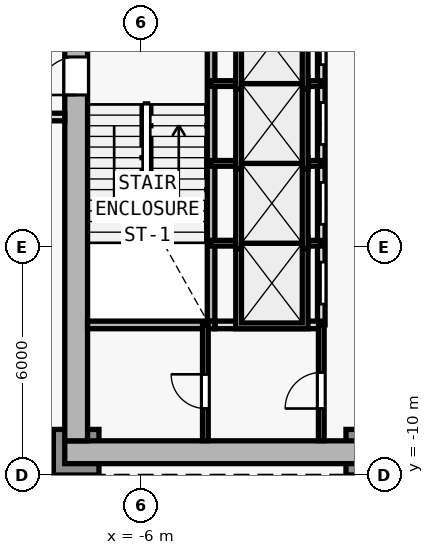
"""IFC4 building model, lengths in metres.
Left out: names, types, materials, properties, quantities, classifications, styles, units other than length and angle.
Written with IfcOpenShell. Run it as: python <this file> out.ifc"""

import sys

from ifc_helpers import new_model, si_unit, direction, frame, frame_2d, origin, origin_2d, place, context, subcontext, project, spatial, rectangle, extrude, element, fill, save


model = new_model("IFC4")
c1 = context("Model", 3, precision=1e-05, world=origin(), true_north=direction((0.0, 1.0)))
c2 = subcontext(c1, "Body", "Model", "MODEL_VIEW")
j1 = project(units=[si_unit("LENGTHUNIT", "METRE"), si_unit("PLANEANGLEUNIT", "RADIAN")], contexts=[c1])
p1 = place(None, origin())
s1 = spatial("IfcSite", under=j1, at=p1, CompositionType="ELEMENT")
p2 = place(p1, origin())
s2 = spatial("IfcBuilding", under=s1, at=p2, CompositionType="ELEMENT")
p3 = place(p2, origin())
s3 = spatial("IfcBuildingStorey", under=s2, at=p3, CompositionType="ELEMENT", Elevation=0.0)
for number, where, z_axis, x_axis in (
    (1, (-7.7, -9.4, 0.0), (0.0, 0.0, 1.0), (1.0, 0.0, 0.0)),
    (2, (0.0, -9.4, 0.0), (0.0, 0.0, 1.0), (1.0, 0.0, 0.0)),
):
    element("IfcColumn", number, at=place(p3, frame(where, z_axis=z_axis, x_axis=x_axis)), inside=s3, PredefinedType="COLUMN", context=c2, shape_type="SweptSolid", body=[
        extrude(rectangle(XDim=1.2, YDim=1.2, at=origin_2d()), origin(), (0.0, 0.0, 1.0), 5.0),
    ])
p4 = place(p3, frame((-8.0, -9.4, 0.0), z_axis=(0.0, 0.0, 1.0), x_axis=(1.0, 0.0, 0.0)))
e3 = element("IfcWall", 3, at=p4, inside=s3, PredefinedType="SHEAR", context=c2, shape_type="SweptSolid", body=[
    extrude(rectangle(XDim=16.0, YDim=0.6, at=frame_2d((8.0, 0.0))), origin(), (0.0, 0.0, 1.0), 4.72),
])
p5 = place(p4, frame((9.65, 0.0, 0.0)))
e4 = element("IfcOpeningElement", 4, at=p5, cuts=e3, PredefinedType="OPENING", context=c2, shape_type="SweptSolid", body=[
    extrude(rectangle(XDim=1.5, YDim=2.2, at=frame_2d((0.75, 1.1))), frame((0.0, 0.31, 0.0), z_axis=(0.0, -1.0, 0.0), x_axis=(1.0, 0.0, 0.0)), (0.0, 0.0, 1.0), 0.62),
])
p6 = place(p3, frame((-7.7, -9.1, 0.0), z_axis=(0.0, 0.0, 1.0), x_axis=(0.0, 1.0, 0.0)))
e5 = element("IfcWall", 5, at=p6, inside=s3, PredefinedType="SHEAR", context=c2, shape_type="SweptSolid", body=[
    extrude(rectangle(XDim=19.0, YDim=0.6, at=frame_2d((9.5, 0.0))), origin(), (0.0, 0.0, 1.0), 4.72),
])
p7 = place(p6, frame((12.65, 0.0, 0.0)))
e6 = element("IfcOpeningElement", 6, at=p7, cuts=e5, PredefinedType="OPENING", context=c2, shape_type="SweptSolid", body=[
    extrude(rectangle(XDim=1.1, YDim=2.15, at=frame_2d((0.55, 1.075))), frame((0.0, 0.31, 0.0), z_axis=(0.0, -1.0, 0.0), x_axis=(1.0, 0.0, 0.0)), (0.0, 0.0, 1.0), 0.62),
])
p8 = place(p6, frame((9.1, 0.0, 0.0)))
e7 = element("IfcOpeningElement", 7, at=p8, cuts=e5, PredefinedType="OPENING", context=c2, shape_type="SweptSolid", body=[
    extrude(rectangle(XDim=1.0, YDim=2.15, at=frame_2d((0.5, 1.075))), frame((0.0, 0.31, 0.0), z_axis=(0.0, -1.0, 0.0), x_axis=(1.0, 0.0, 0.0)), (0.0, 0.0, 1.0), 0.62),
])
p9 = place(p3, frame((-4.15, -5.95, 0.0), z_axis=(0.0, 0.0, 1.0), x_axis=(0.0, 1.0, 0.0)))
e8 = element("IfcWall", 8, at=p9, inside=s3, PredefinedType="SOLIDWALL", context=c2, shape_type="SweptSolid", body=[
    extrude(rectangle(XDim=7.2, YDim=0.2, at=frame_2d((3.6, 0.0))), origin(), (0.0, 0.0, 1.0), 4.72),
])
p10 = place(p3, frame((-1.25, -6.05, 0.0), z_axis=(0.0, 0.0, 1.0), x_axis=(0.0, 1.0, 0.0)))
e9 = element("IfcWall", 9, at=p10, inside=s3, PredefinedType="SOLIDWALL", context=c2, shape_type="SweptSolid", body=[
    extrude(rectangle(XDim=8.7, YDim=0.2, at=frame_2d((4.35, 0.0))), origin(), (0.0, 0.0, 1.0), 4.72),
])
p11 = place(p10, frame((0.55, 0.0, 0.0)))
e10 = element("IfcOpeningElement", 10, at=p11, cuts=e9, PredefinedType="OPENING", context=c2, shape_type="SweptSolid", body=[
    extrude(rectangle(XDim=1.1, YDim=2.15, at=frame_2d((0.55, 1.075))), frame((0.0, 0.11, 0.0), z_axis=(0.0, -1.0, 0.0), x_axis=(1.0, 0.0, 0.0)), (0.0, 0.0, 1.0), 0.22),
])
p12 = place(p10, frame((2.65, 0.0, 0.0)))
e11 = element("IfcOpeningElement", 11, at=p12, cuts=e9, PredefinedType="OPENING", context=c2, shape_type="SweptSolid", body=[
    extrude(rectangle(XDim=1.1, YDim=2.15, at=frame_2d((0.55, 1.075))), frame((0.0, 0.11, 0.0), z_axis=(0.0, -1.0, 0.0), x_axis=(1.0, 0.0, 0.0)), (0.0, 0.0, 1.0), 0.22),
])
p13 = place(p10, frame((4.75, 0.0, 0.0)))
e12 = element("IfcOpeningElement", 12, at=p13, cuts=e9, PredefinedType="OPENING", context=c2, shape_type="SweptSolid", body=[
    extrude(rectangle(XDim=1.1, YDim=2.15, at=frame_2d((0.55, 1.075))), frame((0.0, 0.11, 0.0), z_axis=(0.0, -1.0, 0.0), x_axis=(1.0, 0.0, 0.0)), (0.0, 0.0, 1.0), 0.22),
])
p14 = place(p10, frame((6.85, 0.0, 0.0)))
e13 = element("IfcOpeningElement", 13, at=p14, cuts=e9, PredefinedType="OPENING", context=c2, shape_type="SweptSolid", body=[
    extrude(rectangle(XDim=1.1, YDim=2.15, at=frame_2d((0.55, 1.075))), frame((0.0, 0.11, 0.0), z_axis=(0.0, -1.0, 0.0), x_axis=(1.0, 0.0, 0.0)), (0.0, 0.0, 1.0), 0.22),
])
for number, where, z_axis, x_axis in (
    (14, (-4.15, -3.9, 0.0), (0.0, 0.0, 1.0), (1.0, 0.0, 0.0)),
    (15, (-4.15, -1.8, 0.0), (0.0, 0.0, 1.0), (1.0, 0.0, 0.0)),
    (16, (-4.15, 0.3, 0.0), (0.0, 0.0, 1.0), (1.0, 0.0, 0.0)),
):
    element("IfcWall", number, at=place(p3, frame(where, z_axis=z_axis, x_axis=x_axis)), inside=s3, PredefinedType="PARTITIONING", context=c2, shape_type="SweptSolid", body=[
        extrude(rectangle(XDim=2.9, YDim=0.15, at=frame_2d((1.45, 0.0))), origin(), (0.0, 0.0, 1.0), 4.72),
    ])
p15 = place(p3, frame((-7.4, -6.05, 0.0), z_axis=(0.0, 0.0, 1.0), x_axis=(1.0, 0.0, 0.0)))
e17 = element("IfcWall", 17, at=p15, inside=s3, PredefinedType="SOLIDWALL", context=c2, shape_type="SweptSolid", body=[
    extrude(rectangle(XDim=3.35, YDim=0.2, at=frame_2d((1.675, 0.0))), origin(), (0.0, 0.0, 1.0), 4.72),
])
p16 = place(p3, frame((-4.04, -6.05, 0.0), z_axis=(0.0, 0.0, 1.0), x_axis=(1.0, 0.0, 0.0)))
e18 = element("IfcWall", 18, at=p16, inside=s3, PredefinedType="SOLIDWALL", context=c2, shape_type="SweptSolid", body=[
    extrude(rectangle(XDim=2.79, YDim=0.2, at=frame_2d((1.395, 0.0))), origin(), (0.0, 0.0, 1.0), 4.72),
])
p17 = place(p3, frame((-1.25, -9.095, 0.0), z_axis=(0.0, 0.0, 1.0), x_axis=(0.0, 1.0, 0.0)))
e19 = element("IfcWall", 19, at=p17, inside=s3, PredefinedType="PARTITIONING", context=c2, shape_type="SweptSolid", body=[
    extrude(rectangle(XDim=3.045, YDim=0.15, at=frame_2d((1.522, 0.0))), origin(), (0.0, 0.0, 1.0), 4.72),
])
p18 = place(p17, frame((0.845, 0.0, 0.0)))
e20 = element("IfcOpeningElement", 20, at=p18, cuts=e19, PredefinedType="OPENING", context=c2, shape_type="SweptSolid", body=[
    extrude(rectangle(XDim=0.95, YDim=2.1, at=frame_2d((0.475, 1.05))), frame((0.0, 0.085, 0.0), z_axis=(0.0, -1.0, 0.0), x_axis=(1.0, 0.0, 0.0)), (0.0, 0.0, 1.0), 0.17),
])
p19 = place(p3, frame((-4.3, -9.095, 0.0), z_axis=(0.0, 0.0, 1.0), x_axis=(0.0, 1.0, 0.0)))
e21 = element("IfcWall", 21, at=p19, inside=s3, PredefinedType="PARTITIONING", context=c2, shape_type="SweptSolid", body=[
    extrude(rectangle(XDim=3.045, YDim=0.15, at=frame_2d((1.522, 0.0))), origin(), (0.0, 0.0, 1.0), 4.72),
])
p20 = place(p19, frame((0.845, 0.0, 0.0)))
e22 = element("IfcOpeningElement", 22, at=p20, cuts=e21, PredefinedType="OPENING", context=c2, shape_type="SweptSolid", body=[
    extrude(rectangle(XDim=0.9, YDim=2.1, at=frame_2d((0.45, 1.05))), frame((0.0, 0.085, 0.0), z_axis=(0.0, -1.0, 0.0), x_axis=(1.0, 0.0, 0.0)), (0.0, 0.0, 1.0), 0.17),
])
p21 = place(p3, frame((-40.82, -0.58, 0.0), z_axis=(0.0, 0.0, 1.0), x_axis=(1.0, 0.0, 0.0)))
e23 = element("IfcWall", 23, at=p21, inside=s3, PredefinedType="SOLIDWALL", context=c2, shape_type="SweptSolid", body=[
    extrude(rectangle(XDim=32.82, YDim=0.2, at=frame_2d((16.41, 0.0))), origin(), (0.0, 0.0, 1.0), 4.105),
])
p22 = place(p8, origin())
e24 = element("IfcDoor", 24, at=p22, inside=s3, OperationType="SINGLE_SWING_LEFT", PredefinedType="DOOR", context=c2, shape_type="SweptSolid", body=[
    extrude(rectangle(XDim=1.0, YDim=2.15, at=frame_2d((0.5, 1.075))), frame((0.0, 0.025, 0.0), z_axis=(0.0, -1.0, 0.0), x_axis=(1.0, 0.0, 0.0)), (0.0, 0.0, 1.0), 0.05),
])
fill(e7, e24)
p23 = place(p11, origin())
e25 = element("IfcDoor", 25, at=p23, inside=s3, OperationType="DOUBLE_DOOR_SLIDING", PredefinedType="DOOR", context=c2, shape_type="SweptSolid", body=[
    extrude(rectangle(XDim=1.1, YDim=2.15, at=frame_2d((0.55, 1.075))), frame((0.0, 0.025, 0.0), z_axis=(0.0, -1.0, 0.0), x_axis=(1.0, 0.0, 0.0)), (0.0, 0.0, 1.0), 0.05),
])
fill(e10, e25)
p24 = place(p12, origin())
e26 = element("IfcDoor", 26, at=p24, inside=s3, OperationType="DOUBLE_DOOR_SLIDING", PredefinedType="DOOR", context=c2, shape_type="SweptSolid", body=[
    extrude(rectangle(XDim=1.1, YDim=2.15, at=frame_2d((0.55, 1.075))), frame((0.0, 0.025, 0.0), z_axis=(0.0, -1.0, 0.0), x_axis=(1.0, 0.0, 0.0)), (0.0, 0.0, 1.0), 0.05),
])
fill(e11, e26)
p25 = place(p13, origin())
e27 = element("IfcDoor", 27, at=p25, inside=s3, OperationType="DOUBLE_DOOR_SLIDING", PredefinedType="DOOR", context=c2, shape_type="SweptSolid", body=[
    extrude(rectangle(XDim=1.1, YDim=2.15, at=frame_2d((0.55, 1.075))), frame((0.0, 0.025, 0.0), z_axis=(0.0, -1.0, 0.0), x_axis=(1.0, 0.0, 0.0)), (0.0, 0.0, 1.0), 0.05),
])
fill(e12, e27)
p26 = place(p14, origin())
e28 = element("IfcDoor", 28, at=p26, inside=s3, OperationType="DOUBLE_DOOR_SLIDING", PredefinedType="DOOR", context=c2, shape_type="SweptSolid", body=[
    extrude(rectangle(XDim=1.1, YDim=2.15, at=frame_2d((0.55, 1.075))), frame((0.0, 0.025, 0.0), z_axis=(0.0, -1.0, 0.0), x_axis=(1.0, 0.0, 0.0)), (0.0, 0.0, 1.0), 0.05),
])
fill(e13, e28)
p27 = place(p18, origin())
e29 = element("IfcDoor", 29, at=p27, inside=s3, OperationType="SINGLE_SWING_LEFT", PredefinedType="DOOR", context=c2, shape_type="SweptSolid", body=[
    extrude(rectangle(XDim=0.95, YDim=2.1, at=frame_2d((0.475, 1.05))), frame((0.0, 0.025, 0.0), z_axis=(0.0, -1.0, 0.0), x_axis=(1.0, 0.0, 0.0)), (0.0, 0.0, 1.0), 0.05),
])
fill(e20, e29)
p28 = place(p20, origin())
e30 = element("IfcDoor", 30, at=p28, inside=s3, OperationType="SINGLE_SWING_RIGHT", PredefinedType="DOOR", context=c2, shape_type="SweptSolid", body=[
    extrude(rectangle(XDim=0.9, YDim=2.1, at=frame_2d((0.45, 1.05))), frame((0.0, 0.025, 0.0), z_axis=(0.0, -1.0, 0.0), x_axis=(1.0, 0.0, 0.0)), (0.0, 0.0, 1.0), 0.05),
])
fill(e22, e30)
save(model, sys.argv[1])
